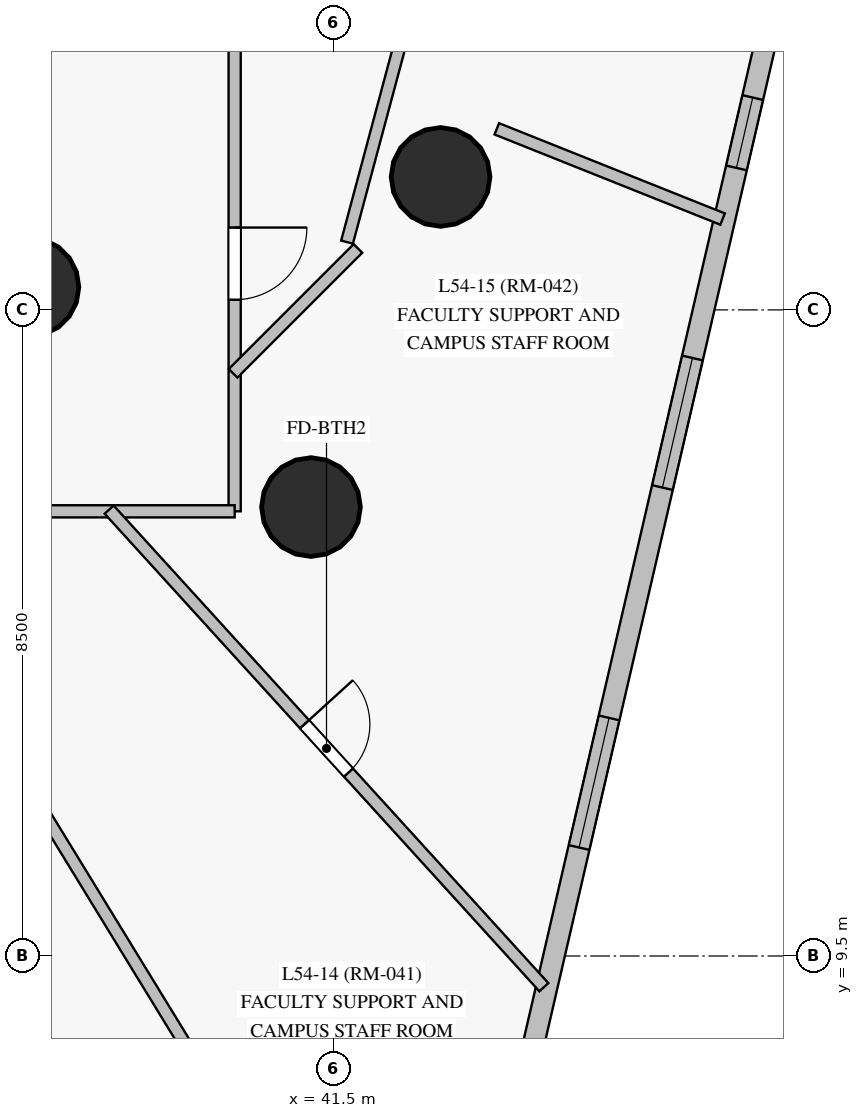
"""IFC4 building model, lengths in metres.
Left out: names, types, materials, properties, quantities, classifications, styles, units other than length and angle.
Written with IfcOpenShell. Run it as: python <this file> out.ifc"""

import sys

from ifc_helpers import new_model, si_unit, direction, frame, frame_2d, origin, origin_with_axes, origin_2d, place, context, subcontext, project, spatial, rectangle, circle, extrude, source, transform, mapped, element, fill, save


model = new_model("IFC4")
c1 = context("Model", 3, precision=1e-05, world=origin(), true_north=direction((0.0, 1.0)))
c2 = subcontext(c1, "Body", "Model", "MODEL_VIEW")
j1 = project(units=[si_unit("LENGTHUNIT", "METRE"), si_unit("PLANEANGLEUNIT", "RADIAN")], contexts=[c1])
p1 = place(None, origin())
s1 = spatial("IfcSite", under=j1, at=p1, CompositionType="ELEMENT")
p2 = place(p1, origin())
s2 = spatial("IfcBuilding", under=s1, at=p2, CompositionType="ELEMENT")
p3 = place(p2, frame((0.0, 0.0, 187.05)))
s3 = spatial("IfcBuildingStorey", under=s2, at=p3, CompositionType="ELEMENT", Elevation=187.05)
m1 = source(origin_with_axes(), c2, "Body", "SweptSolid", [
    extrude(circle(Radius=0.65, at=origin_2d()), origin(), (0.0, 0.0, 1.0), 3.05),
])
for number, where, z_axis, x_axis in (
    (1, (37.5, 18.3, 0.0), (0.0, 0.0, 1.0), (1.0, 0.0, 0.0)),
    (2, (42.909, 19.749, 0.0), (0.0, 0.0, 1.0), (1.0, 0.0, 0.0)),
    (3, (41.204, 15.406, 0.0), (0.0, 0.0, 1.0), (1.0, 0.0, 0.0)),
):
    element("IfcColumn", number, at=place(p3, frame(where, z_axis=z_axis, x_axis=x_axis)), inside=s3, PredefinedType="COLUMN", context=c2, shape_type="MappedRepresentation", body=[
        mapped(m1, transform((0.0, 0.0, 0.0), scale=1.0)),
    ])
p4 = place(p3, frame((43.942, 7.521, 0.0), z_axis=(0.0, 0.0, 1.0), x_axis=(0.225598723883, 0.974220311727, 0.0)))
e4 = element("IfcWall", 4, at=p4, inside=s3, PredefinedType="SOLIDWALL", context=c2, shape_type="SweptSolid", body=[
    extrude(rectangle(XDim=14.375, YDim=0.28, at=frame_2d((7.188, 0.0))), origin(), (0.0, 0.0, 1.0), 2.825),
])
p5 = place(p4, frame((3.496, 0.0, 0.85)))
e5 = element("IfcOpeningElement", 5, at=p5, cuts=e4, PredefinedType="OPENING", context=c2, shape_type="SweptSolid", body=[
    extrude(rectangle(XDim=1.75, YDim=1.65, at=frame_2d((0.875, 0.825))), frame((0.0, 0.15, 0.0), z_axis=(0.0, -1.0, 0.0), x_axis=(1.0, 0.0, 0.0)), (0.0, 0.0, 1.0), 0.3),
])
p6 = place(p4, frame((8.356, 0.0, 0.85)))
e6 = element("IfcOpeningElement", 6, at=p6, cuts=e4, PredefinedType="OPENING", context=c2, shape_type="SweptSolid", body=[
    extrude(rectangle(XDim=1.75, YDim=1.65, at=frame_2d((0.875, 0.825))), frame((0.0, 0.15, 0.0), z_axis=(0.0, -1.0, 0.0), x_axis=(1.0, 0.0, 0.0)), (0.0, 0.0, 1.0), 0.3),
])
p7 = place(p4, frame((12.673, 0.0, 0.85)))
e7 = element("IfcOpeningElement", 7, at=p7, cuts=e4, PredefinedType="OPENING", context=c2, shape_type="SweptSolid", body=[
    extrude(rectangle(XDim=0.95, YDim=1.5, at=frame_2d((0.475, 0.75))), frame((0.0, 0.15, 0.0), z_axis=(0.0, -1.0, 0.0), x_axis=(1.0, 0.0, 0.0)), (0.0, 0.0, 1.0), 0.3),
])
p8 = place(p3, frame((40.2, 37.65, 0.0), z_axis=(0.0, 0.0, 1.0), x_axis=(0.0, -1.0, 0.0)))
e8 = element("IfcWall", 8, at=p8, inside=s3, PredefinedType="PARTITIONING", context=c2, shape_type="SweptSolid", body=[
    extrude(rectangle(XDim=22.3, YDim=0.16, at=frame_2d((11.15, 0.0))), origin(), (0.0, 0.0, 1.0), 2.375),
])
p9 = place(p8, frame((18.567, 0.0, 0.0)))
e9 = element("IfcOpeningElement", 9, at=p9, cuts=e8, PredefinedType="OPENING", context=c2, shape_type="SweptSolid", body=[
    extrude(rectangle(XDim=0.95, YDim=2.15, at=frame_2d((0.475, 1.075))), frame((0.0, 0.09, 0.0), z_axis=(0.0, -1.0, 0.0), x_axis=(1.0, 0.0, 0.0)), (0.0, 0.0, 1.0), 0.18),
])
p10 = place(p8, frame((11.165, 0.0, 0.0)))
e10 = element("IfcOpeningElement", 10, at=p10, cuts=e8, PredefinedType="OPENING", context=c2, shape_type="SweptSolid", body=[
    extrude(rectangle(XDim=0.95, YDim=2.15, at=frame_2d((0.475, 1.075))), frame((0.0, 0.09, 0.0), z_axis=(0.0, -1.0, 0.0), x_axis=(1.0, 0.0, 0.0)), (0.0, 0.0, 1.0), 0.18),
])
p11 = place(p8, frame((7.33, 0.0, 0.0)))
e11 = element("IfcOpeningElement", 11, at=p11, cuts=e8, PredefinedType="OPENING", context=c2, shape_type="SweptSolid", body=[
    extrude(rectangle(XDim=0.95, YDim=2.15, at=frame_2d((0.475, 1.075))), frame((0.0, 0.09, 0.0), z_axis=(0.0, -1.0, 0.0), x_axis=(1.0, 0.0, 0.0)), (0.0, 0.0, 1.0), 0.18),
])
p12 = place(p8, frame((4.66, 0.0, 0.0)))
e12 = element("IfcOpeningElement", 12, at=p12, cuts=e8, PredefinedType="OPENING", context=c2, shape_type="SweptSolid", body=[
    extrude(rectangle(XDim=0.95, YDim=2.15, at=frame_2d((0.475, 1.075))), frame((0.0, 0.09, 0.0), z_axis=(0.0, -1.0, 0.0), x_axis=(1.0, 0.0, 0.0)), (0.0, 0.0, 1.0), 0.18),
])
p13 = place(p3, frame((33.252, 15.377, 0.0), z_axis=(0.0, 0.0, 1.0), x_axis=(0.397438924914, -0.917628629111, 0.0)))
e13 = element("IfcWall", 13, at=p13, inside=s3, PredefinedType="PARTITIONING", context=c2, shape_type="SweptSolid", body=[
    extrude(rectangle(XDim=12.564, YDim=0.16, at=frame_2d((6.282, 0.0))), origin(), (0.0, 0.0, 1.0), 2.825),
])
p14 = place(p3, frame((35.241, 15.375, 0.0), z_axis=(0.0, 0.0, 1.0), x_axis=(0.522187833878, -0.852830502591, 0.0)))
e14 = element("IfcWall", 14, at=p14, inside=s3, PredefinedType="PARTITIONING", context=c2, shape_type="SweptSolid", body=[
    extrude(rectangle(XDim=11.307, YDim=0.16, at=frame_2d((5.653, 0.0))), origin(), (0.0, 0.0, 1.0), 2.825),
])
p15 = place(p3, frame((40.2, 15.35, 0.0), z_axis=(0.0, 0.0, 1.0), x_axis=(-1.0, 0.0, 0.0)))
e15 = element("IfcWall", 15, at=p15, inside=s3, PredefinedType="PARTITIONING", context=c2, shape_type="SweptSolid", body=[
    extrude(rectangle(XDim=10.65, YDim=0.16, at=frame_2d((5.325, 0.0))), origin(), (0.0, 0.0, 1.0), 2.275),
])
p16 = place(p15, frame((9.181, 0.0, 0.0)))
e16 = element("IfcOpeningElement", 16, at=p16, cuts=e15, PredefinedType="OPENING", context=c2, shape_type="SweptSolid", body=[
    extrude(rectangle(XDim=0.86, YDim=2.1, at=frame_2d((0.43, 1.05))), frame((0.0, 0.09, 0.0), z_axis=(0.0, -1.0, 0.0), x_axis=(1.0, 0.0, 0.0)), (0.0, 0.0, 1.0), 0.18),
])
p17 = place(p15, frame((7.188, 0.0, 0.0)))
e17 = element("IfcOpeningElement", 17, at=p17, cuts=e15, PredefinedType="OPENING", context=c2, shape_type="SweptSolid", body=[
    extrude(rectangle(XDim=0.95, YDim=2.15, at=frame_2d((0.475, 1.075))), frame((0.0, 0.09, 0.0), z_axis=(0.0, -1.0, 0.0), x_axis=(1.0, 0.0, 0.0)), (0.0, 0.0, 1.0), 0.18),
])
p18 = place(p15, frame((5.19, 0.0, 0.0)))
e18 = element("IfcOpeningElement", 18, at=p18, cuts=e15, PredefinedType="OPENING", context=c2, shape_type="SweptSolid", body=[
    extrude(rectangle(XDim=0.95, YDim=2.15, at=frame_2d((0.475, 1.075))), frame((0.0, 0.09, 0.0), z_axis=(0.0, -1.0, 0.0), x_axis=(1.0, 0.0, 0.0)), (0.0, 0.0, 1.0), 0.18),
])
p19 = place(p15, frame((3.252, 0.0, 0.0)))
e19 = element("IfcOpeningElement", 19, at=p19, cuts=e15, PredefinedType="OPENING", context=c2, shape_type="SweptSolid", body=[
    extrude(rectangle(XDim=0.95, YDim=2.15, at=frame_2d((0.475, 1.075))), frame((0.0, 0.09, 0.0), z_axis=(0.0, -1.0, 0.0), x_axis=(1.0, 0.0, 0.0)), (0.0, 0.0, 1.0), 0.18),
])
p20 = place(p3, frame((38.549, 15.372, 0.0), z_axis=(0.0, 0.0, 1.0), x_axis=(0.673168934691, -0.739488732414, 0.0)))
e20 = element("IfcWall", 20, at=p20, inside=s3, PredefinedType="PARTITIONING", context=c2, shape_type="SweptSolid", body=[
    extrude(rectangle(XDim=8.496, YDim=0.16, at=frame_2d((4.248, 0.0))), origin(), (0.0, 0.0, 1.0), 2.825),
])
p21 = place(p20, frame((3.818, 0.0, 0.0)))
e21 = element("IfcOpeningElement", 21, at=p21, cuts=e20, PredefinedType="OPENING", context=c2, shape_type="SweptSolid", body=[
    extrude(rectangle(XDim=0.86, YDim=2.04, at=frame_2d((0.43, 1.02))), frame((0.0, 0.09, 0.0), z_axis=(0.0, -1.0, 0.0), x_axis=(1.0, 0.0, 0.0)), (0.0, 0.0, 1.0), 0.18),
])
p22 = place(p3, frame((43.802, 26.817, 0.0), z_axis=(0.0, 0.0, 1.0), x_axis=(-0.25881986312, -0.965925607102, 0.0)))
e22 = element("IfcWall", 22, at=p22, inside=s3, PredefinedType="PARTITIONING", context=c2, shape_type="SweptSolid", body=[
    extrude(rectangle(XDim=8.206, YDim=0.16, at=frame_2d((4.103, 0.0))), origin(), (0.0, 0.0, 1.0), 2.275),
])
p23 = place(p22, frame((3.792, 0.0, 0.0)))
e23 = element("IfcOpeningElement", 23, at=p23, cuts=e22, PredefinedType="OPENING", context=c2, shape_type="SweptSolid", body=[
    extrude(rectangle(XDim=0.95, YDim=2.15, at=frame_2d((0.475, 1.075))), frame((0.0, 0.09, 0.0), z_axis=(0.0, -1.0, 0.0), x_axis=(1.0, 0.0, 0.0)), (0.0, 0.0, 1.0), 0.18),
])
p24 = place(p3, frame((43.649, 20.382, 0.0), z_axis=(0.0, 0.0, 1.0), x_axis=(0.928618752778, -0.37103532445, 0.0)))
e24 = element("IfcWall", 24, at=p24, inside=s3, PredefinedType="PARTITIONING", context=c2, shape_type="SweptSolid", body=[
    extrude(rectangle(XDim=3.198, YDim=0.16, at=frame_2d((1.599, 0.0))), origin(), (0.0, 0.0, 1.0), 2.825),
])
p25 = place(p3, frame((40.179, 17.166, 0.0), z_axis=(0.0, 0.0, 1.0), x_axis=(0.707159309269, 0.707054249202, 0.0)))
e25 = element("IfcWall", 25, at=p25, inside=s3, PredefinedType="PARTITIONING", context=c2, shape_type="SweptSolid", body=[
    extrude(rectangle(XDim=2.324, YDim=0.16, at=frame_2d((1.162, 0.0))), origin(), (0.0, 0.0, 1.0), 2.275),
])
m2 = source(origin_with_axes(), c2, "Body", "SweptSolid", [
    extrude(rectangle(XDim=1.75, YDim=1.65, at=frame_2d((0.875, 0.825))), frame((0.0, 0.03, 0.0), z_axis=(0.0, -1.0, 0.0), x_axis=(1.0, 0.0, 0.0)), (0.0, 0.0, 1.0), 0.06),
])
p26 = place(p5, origin())
e26 = element("IfcWindow", 26, at=p26, inside=s3, PartitioningType="SINGLE_PANEL", PredefinedType="WINDOW", context=c2, shape_type="MappedRepresentation", body=[
    mapped(m2, transform((0.0, 0.0, 0.0), scale=1.0)),
])
fill(e5, e26)
p27 = place(p6, origin())
e27 = element("IfcWindow", 27, at=p27, inside=s3, PartitioningType="SINGLE_PANEL", PredefinedType="WINDOW", context=c2, shape_type="MappedRepresentation", body=[
    mapped(m2, transform((0.0, 0.0, 0.0), scale=1.0)),
])
fill(e6, e27)
m3 = source(origin_with_axes(), c2, "Body", "SweptSolid", [
    extrude(rectangle(XDim=0.95, YDim=1.5, at=frame_2d((0.475, 0.75))), frame((0.0, 0.03, 0.0), z_axis=(0.0, -1.0, 0.0), x_axis=(1.0, 0.0, 0.0)), (0.0, 0.0, 1.0), 0.06),
])
p28 = place(p7, origin())
e28 = element("IfcWindow", 28, at=p28, inside=s3, PartitioningType="SINGLE_PANEL", PredefinedType="WINDOW", context=c2, shape_type="MappedRepresentation", body=[
    mapped(m3, transform((0.0, 0.0, 0.0), scale=1.0)),
])
fill(e7, e28)
m4 = source(origin_with_axes(), c2, "Body", "SweptSolid", [
    extrude(rectangle(XDim=0.95, YDim=2.15, at=frame_2d((0.475, 1.075))), frame((0.0, 0.025, 0.0), z_axis=(0.0, -1.0, 0.0), x_axis=(1.0, 0.0, 0.0)), (0.0, 0.0, 1.0), 0.05),
])
p29 = place(p9, origin())
e29 = element("IfcDoor", 29, at=p29, inside=s3, OperationType="SINGLE_SWING_LEFT", PredefinedType="DOOR", context=c2, shape_type="MappedRepresentation", body=[
    mapped(m4, transform((0.0, 0.0, 0.0), scale=1.0)),
])
fill(e9, e29)
m5 = source(origin_with_axes(), c2, "Body", "SweptSolid", [
    extrude(rectangle(XDim=0.86, YDim=2.04, at=frame_2d((0.43, 1.02))), frame((0.0, 0.025, 0.0), z_axis=(0.0, -1.0, 0.0), x_axis=(1.0, 0.0, 0.0)), (0.0, 0.0, 1.0), 0.05),
])
p30 = place(p21, origin())
e30 = element("IfcDoor", 30, at=p30, inside=s3, OperationType="SINGLE_SWING_LEFT", PredefinedType="DOOR", context=c2, shape_type="MappedRepresentation", body=[
    mapped(m5, transform((0.0, 0.0, 0.0), scale=1.0)),
])
fill(e21, e30)
save(model, sys.argv[1])
